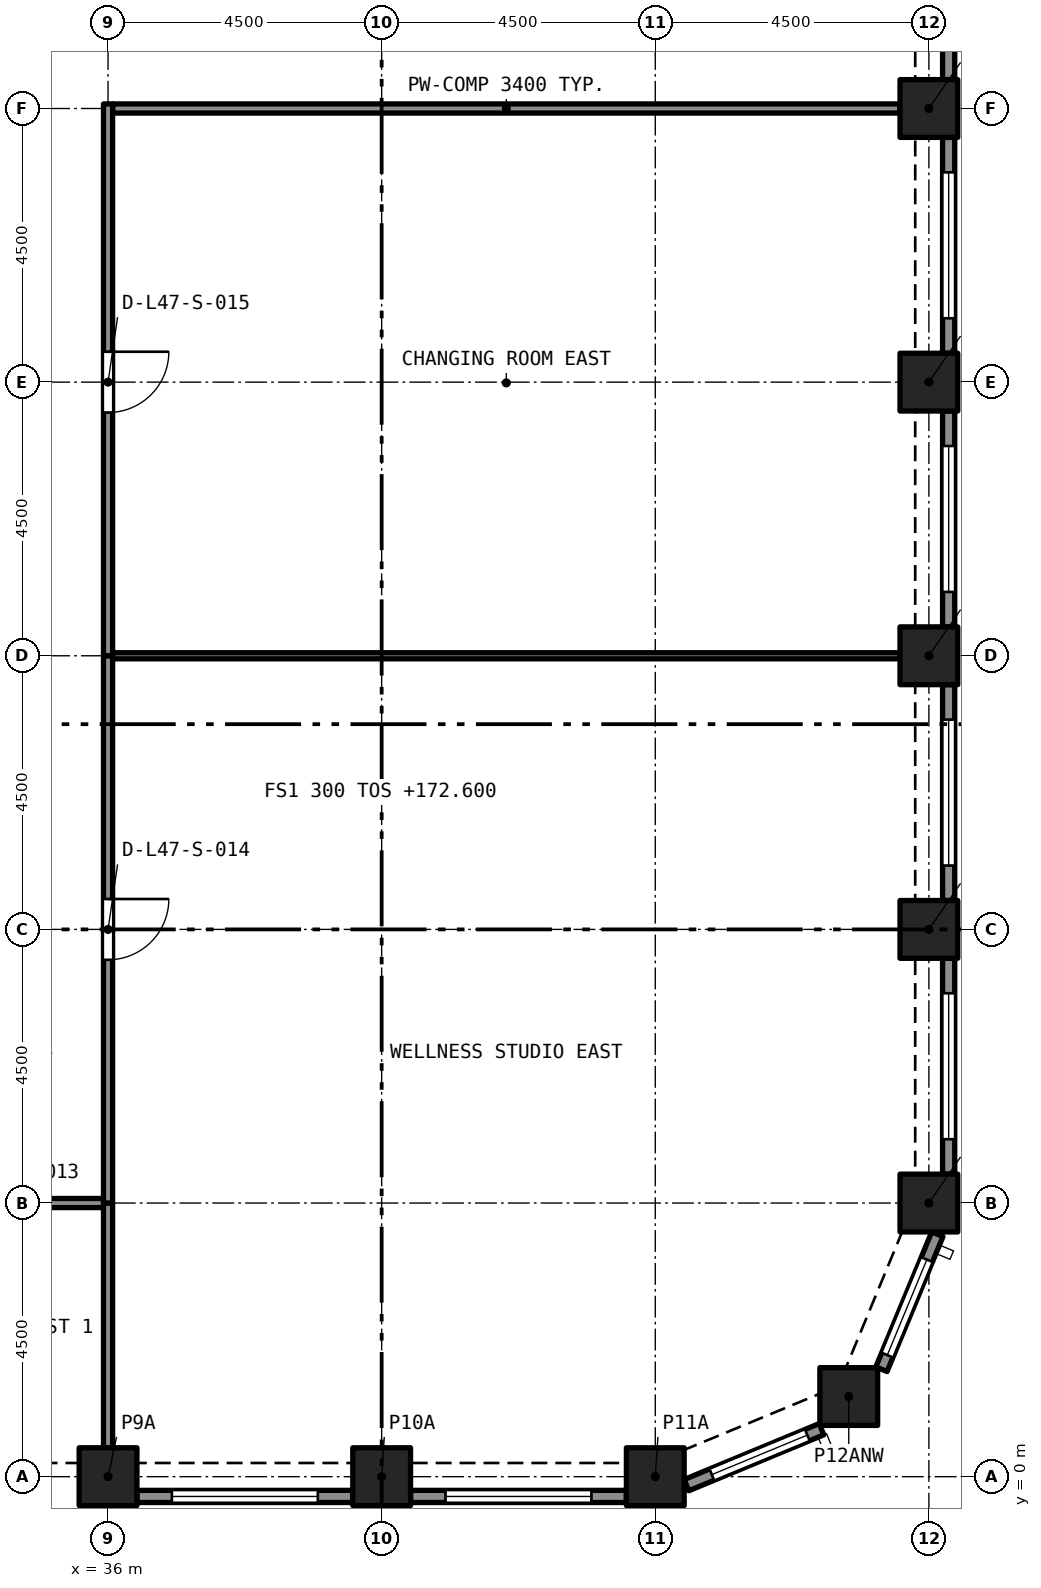
"""IFC4 building model, lengths in metres.
Left out: names, types, materials, properties, quantities, classifications, styles, units other than length and angle.
Written with IfcOpenShell. Run it as: python <this file> out.ifc"""

import sys

from ifc_helpers import new_model, si_unit, direction, frame, frame_2d, origin, origin_2d, place, context, subcontext, project, spatial, rectangle, extrude, element, fill, save


model = new_model("IFC4")
c1 = context("Model", 3, precision=1e-05, world=origin(), true_north=direction((0.0, 1.0)))
c2 = subcontext(c1, "Body", "Model", "MODEL_VIEW")
j1 = project(units=[si_unit("LENGTHUNIT", "METRE"), si_unit("PLANEANGLEUNIT", "RADIAN")], contexts=[c1])
p1 = place(None, origin())
s1 = spatial("IfcSite", under=j1, at=p1, CompositionType="ELEMENT")
p2 = place(p1, origin())
s2 = spatial("IfcBuilding", under=s1, at=p2, CompositionType="ELEMENT")
p3 = place(p2, frame((0.0, 0.0, 172.6)))
s3 = spatial("IfcBuildingStorey", under=s2, at=p3, CompositionType="ELEMENT", Elevation=172.6)
for number, where, z_axis, x_axis in (
    (1, (36.0, 0.0, 0.0), (0.0, 0.0, 1.0), (1.0, 0.0, 0.0)),
    (2, (40.5, 0.0, 0.0), (0.0, 0.0, 1.0), (1.0, 0.0, 0.0)),
    (3, (45.0, 0.0, 0.0), (0.0, 0.0, 1.0), (1.0, 0.0, 0.0)),
    (4, (48.182, 1.318, 0.0), (0.0, 0.0, 1.0), (1.0, 0.0, 0.0)),
    (5, (49.5, 4.5, 0.0), (0.0, 0.0, 1.0), (1.0, 0.0, 0.0)),
    (6, (49.5, 9.0, 0.0), (0.0, 0.0, 1.0), (1.0, 0.0, 0.0)),
    (7, (49.5, 13.5, 0.0), (0.0, 0.0, 1.0), (1.0, 0.0, 0.0)),
    (8, (49.5, 18.0, 0.0), (0.0, 0.0, 1.0), (1.0, 0.0, 0.0)),
    (9, (49.5, 22.5, 0.0), (0.0, 0.0, 1.0), (1.0, 0.0, 0.0)),
):
    element("IfcColumn", number, at=place(p3, frame(where, z_axis=z_axis, x_axis=x_axis)), inside=s3, PredefinedType="COLUMN", context=c2, shape_type="SweptSolid", body=[
        extrude(rectangle(XDim=0.95, YDim=0.95, at=origin_2d()), origin(), (0.0, 0.0, 1.0), 3.7),
    ])
p4 = place(p3, frame((40.025, -0.325, 0.0), z_axis=(0.0, 0.0, 1.0), x_axis=(-1.0, 0.0, 0.0)))
e10 = element("IfcWall", 10, at=p4, inside=s3, PredefinedType="SOLIDWALL", context=c2, shape_type="SweptSolid", body=[
    extrude(rectangle(XDim=3.55, YDim=0.2, at=frame_2d((1.775, 0.0))), origin(), (0.0, 0.0, 1.0), 3.7),
])
p5 = place(p4, frame((0.575, 0.0, 0.45)))
e11 = element("IfcOpeningElement", 11, at=p5, cuts=e10, PredefinedType="OPENING", context=c2, shape_type="SweptSolid", body=[
    extrude(rectangle(XDim=2.4, YDim=1.95, at=frame_2d((1.2, 0.975))), frame((0.0, 0.11, 0.0), z_axis=(0.0, -1.0, 0.0), x_axis=(1.0, 0.0, 0.0)), (0.0, 0.0, 1.0), 0.22),
])
p6 = place(p3, frame((44.525, -0.325, 0.0), z_axis=(0.0, 0.0, 1.0), x_axis=(-1.0, 0.0, 0.0)))
e12 = element("IfcWall", 12, at=p6, inside=s3, PredefinedType="SOLIDWALL", context=c2, shape_type="SweptSolid", body=[
    extrude(rectangle(XDim=3.55, YDim=0.2, at=frame_2d((1.775, 0.0))), origin(), (0.0, 0.0, 1.0), 3.7),
])
p7 = place(p6, frame((0.575, 0.0, 0.45)))
e13 = element("IfcOpeningElement", 13, at=p7, cuts=e12, PredefinedType="OPENING", context=c2, shape_type="SweptSolid", body=[
    extrude(rectangle(XDim=2.4, YDim=1.95, at=frame_2d((1.2, 0.975))), frame((0.0, 0.11, 0.0), z_axis=(0.0, -1.0, 0.0), x_axis=(1.0, 0.0, 0.0)), (0.0, 0.0, 1.0), 0.22),
])
p8 = place(p3, frame((47.733, 0.78, 0.0), z_axis=(0.0, 0.0, 1.0), x_axis=(-0.923880599843, -0.382680855588, 0.0)))
e14 = element("IfcWall", 14, at=p8, inside=s3, PredefinedType="SOLIDWALL", context=c2, shape_type="SweptSolid", body=[
    extrude(rectangle(XDim=2.403, YDim=0.2, at=frame_2d((1.201, 0.0))), origin(), (0.0, 0.0, 1.0), 3.7),
])
p9 = place(p8, frame((0.251, 0.0, 0.45)))
e15 = element("IfcOpeningElement", 15, at=p9, cuts=e14, PredefinedType="OPENING", context=c2, shape_type="SweptSolid", body=[
    extrude(rectangle(XDim=1.7, YDim=1.95, at=frame_2d((0.85, 0.975))), frame((0.0, 0.11, 0.0), z_axis=(0.0, -1.0, 0.0), x_axis=(1.0, 0.0, 0.0)), (0.0, 0.0, 1.0), 0.22),
])
p10 = place(p3, frame((49.639, 3.987, 0.0), z_axis=(0.0, 0.0, 1.0), x_axis=(-0.382680855588, -0.923880599843, 0.0)))
e16 = element("IfcWall", 16, at=p10, inside=s3, PredefinedType="SOLIDWALL", context=c2, shape_type="SweptSolid", body=[
    extrude(rectangle(XDim=2.403, YDim=0.2, at=frame_2d((1.201, 0.0))), origin(), (0.0, 0.0, 1.0), 3.7),
])
p11 = place(p10, frame((0.451, 0.0, 0.45)))
e17 = element("IfcOpeningElement", 17, at=p11, cuts=e16, PredefinedType="OPENING", context=c2, shape_type="SweptSolid", body=[
    extrude(rectangle(XDim=1.7, YDim=1.95, at=frame_2d((0.85, 0.975))), frame((0.0, 0.11, 0.0), z_axis=(0.0, -1.0, 0.0), x_axis=(1.0, 0.0, 0.0)), (0.0, 0.0, 1.0), 0.22),
])
p12 = place(p3, frame((49.825, 8.525, 0.0), z_axis=(0.0, 0.0, 1.0), x_axis=(0.0, -1.0, 0.0)))
e18 = element("IfcWall", 18, at=p12, inside=s3, PredefinedType="SOLIDWALL", context=c2, shape_type="SweptSolid", body=[
    extrude(rectangle(XDim=3.55, YDim=0.2, at=frame_2d((1.775, 0.0))), origin(), (0.0, 0.0, 1.0), 3.7),
])
p13 = place(p12, frame((0.575, 0.0, 0.45)))
e19 = element("IfcOpeningElement", 19, at=p13, cuts=e18, PredefinedType="OPENING", context=c2, shape_type="SweptSolid", body=[
    extrude(rectangle(XDim=2.4, YDim=1.95, at=frame_2d((1.2, 0.975))), frame((0.0, 0.11, 0.0), z_axis=(0.0, -1.0, 0.0), x_axis=(1.0, 0.0, 0.0)), (0.0, 0.0, 1.0), 0.22),
])
p14 = place(p3, frame((49.825, 13.025, 0.0), z_axis=(0.0, 0.0, 1.0), x_axis=(0.0, -1.0, 0.0)))
e20 = element("IfcWall", 20, at=p14, inside=s3, PredefinedType="SOLIDWALL", context=c2, shape_type="SweptSolid", body=[
    extrude(rectangle(XDim=3.55, YDim=0.2, at=frame_2d((1.775, 0.0))), origin(), (0.0, 0.0, 1.0), 3.7),
])
p15 = place(p14, frame((0.575, 0.0, 0.45)))
e21 = element("IfcOpeningElement", 21, at=p15, cuts=e20, PredefinedType="OPENING", context=c2, shape_type="SweptSolid", body=[
    extrude(rectangle(XDim=2.4, YDim=1.95, at=frame_2d((1.2, 0.975))), frame((0.0, 0.11, 0.0), z_axis=(0.0, -1.0, 0.0), x_axis=(1.0, 0.0, 0.0)), (0.0, 0.0, 1.0), 0.22),
])
p16 = place(p3, frame((49.825, 17.525, 0.0), z_axis=(0.0, 0.0, 1.0), x_axis=(0.0, -1.0, 0.0)))
e22 = element("IfcWall", 22, at=p16, inside=s3, PredefinedType="SOLIDWALL", context=c2, shape_type="SweptSolid", body=[
    extrude(rectangle(XDim=3.55, YDim=0.2, at=frame_2d((1.775, 0.0))), origin(), (0.0, 0.0, 1.0), 3.7),
])
p17 = place(p16, frame((0.575, 0.0, 0.45)))
e23 = element("IfcOpeningElement", 23, at=p17, cuts=e22, PredefinedType="OPENING", context=c2, shape_type="SweptSolid", body=[
    extrude(rectangle(XDim=2.4, YDim=1.95, at=frame_2d((1.2, 0.975))), frame((0.0, 0.11, 0.0), z_axis=(0.0, -1.0, 0.0), x_axis=(1.0, 0.0, 0.0)), (0.0, 0.0, 1.0), 0.22),
])
p18 = place(p3, frame((49.825, 22.025, 0.0), z_axis=(0.0, 0.0, 1.0), x_axis=(0.0, -1.0, 0.0)))
e24 = element("IfcWall", 24, at=p18, inside=s3, PredefinedType="SOLIDWALL", context=c2, shape_type="SweptSolid", body=[
    extrude(rectangle(XDim=3.55, YDim=0.2, at=frame_2d((1.775, 0.0))), origin(), (0.0, 0.0, 1.0), 3.7),
])
p19 = place(p18, frame((0.575, 0.0, 0.45)))
e25 = element("IfcOpeningElement", 25, at=p19, cuts=e24, PredefinedType="OPENING", context=c2, shape_type="SweptSolid", body=[
    extrude(rectangle(XDim=2.4, YDim=1.95, at=frame_2d((1.2, 0.975))), frame((0.0, 0.11, 0.0), z_axis=(0.0, -1.0, 0.0), x_axis=(1.0, 0.0, 0.0)), (0.0, 0.0, 1.0), 0.22),
])
p20 = place(p3, frame((49.825, 26.525, 0.0), z_axis=(0.0, 0.0, 1.0), x_axis=(0.0, -1.0, 0.0)))
e26 = element("IfcWall", 26, at=p20, inside=s3, PredefinedType="SOLIDWALL", context=c2, shape_type="SweptSolid", body=[
    extrude(rectangle(XDim=3.55, YDim=0.2, at=frame_2d((1.775, 0.0))), origin(), (0.0, 0.0, 1.0), 3.7),
])
p21 = place(p20, frame((0.575, 0.0, 0.45)))
e27 = element("IfcOpeningElement", 27, at=p21, cuts=e26, PredefinedType="OPENING", context=c2, shape_type="SweptSolid", body=[
    extrude(rectangle(XDim=2.4, YDim=1.95, at=frame_2d((1.2, 0.975))), frame((0.0, 0.11, 0.0), z_axis=(0.0, -1.0, 0.0), x_axis=(1.0, 0.0, 0.0)), (0.0, 0.0, 1.0), 0.22),
])
p22 = place(p3, frame((36.075, 22.5, 0.0), z_axis=(0.0, 0.0, 1.0), x_axis=(1.0, 0.0, 0.0)))
e28 = element("IfcWall", 28, at=p22, inside=s3, PredefinedType="PARTITIONING", context=c2, shape_type="SweptSolid", body=[
    extrude(rectangle(XDim=12.95, YDim=0.15, at=frame_2d((6.475, 0.0))), origin(), (0.0, 0.0, 1.0), 3.4),
])
p23 = place(p3, frame((36.0, 0.475, 0.0), z_axis=(0.0, 0.0, 1.0), x_axis=(0.0, 1.0, 0.0)))
e29 = element("IfcWall", 29, at=p23, inside=s3, PredefinedType="PARTITIONING", context=c2, shape_type="SweptSolid", body=[
    extrude(rectangle(XDim=4.025, YDim=0.15, at=frame_2d((2.012, 0.0))), origin(), (0.0, 0.0, 1.0), 3.4),
])
p24 = place(p3, frame((35.925, 4.5, 0.0), z_axis=(0.0, 0.0, 1.0), x_axis=(-1.0, 0.0, 0.0)))
e30 = element("IfcWall", 30, at=p24, inside=s3, PredefinedType="PARTITIONING", context=c2, shape_type="SweptSolid", body=[
    extrude(rectangle(XDim=3.95, YDim=0.15, at=frame_2d((1.975, 0.0))), origin(), (0.0, 0.0, 1.0), 3.4),
])
p25 = place(p24, frame((1.538, 0.0, 0.0)))
e31 = element("IfcOpeningElement", 31, at=p25, cuts=e30, PredefinedType="OPENING", context=c2, shape_type="SweptSolid", body=[
    extrude(rectangle(XDim=0.8, YDim=2.1, at=frame_2d((0.4, 1.05))), frame((0.0, 0.085, 0.0), z_axis=(0.0, -1.0, 0.0), x_axis=(1.0, 0.0, 0.0)), (0.0, 0.0, 1.0), 0.17),
])
p26 = place(p3, frame((36.0, 13.5, 0.0), z_axis=(0.0, 0.0, 1.0), x_axis=(0.0, -1.0, 0.0)))
e32 = element("IfcWall", 32, at=p26, inside=s3, PredefinedType="PARTITIONING", context=c2, shape_type="SweptSolid", body=[
    extrude(rectangle(XDim=9.0, YDim=0.15, at=frame_2d((4.5, 0.0))), origin(), (0.0, 0.0, 1.0), 3.4),
])
p27 = place(p26, frame((4.0, 0.0, 0.0)))
e33 = element("IfcOpeningElement", 33, at=p27, cuts=e32, PredefinedType="OPENING", context=c2, shape_type="SweptSolid", body=[
    extrude(rectangle(XDim=1.0, YDim=2.1, at=frame_2d((0.5, 1.05))), frame((0.0, 0.085, 0.0), z_axis=(0.0, -1.0, 0.0), x_axis=(1.0, 0.0, 0.0)), (0.0, 0.0, 1.0), 0.17),
])
p28 = place(p3, frame((36.0, 22.575, 0.0), z_axis=(0.0, 0.0, 1.0), x_axis=(0.0, -1.0, 0.0)))
e34 = element("IfcWall", 34, at=p28, inside=s3, PredefinedType="PARTITIONING", context=c2, shape_type="SweptSolid", body=[
    extrude(rectangle(XDim=9.075, YDim=0.15, at=frame_2d((4.538, 0.0))), origin(), (0.0, 0.0, 1.0), 3.4),
])
p29 = place(p28, frame((4.075, 0.0, 0.0)))
e35 = element("IfcOpeningElement", 35, at=p29, cuts=e34, PredefinedType="OPENING", context=c2, shape_type="SweptSolid", body=[
    extrude(rectangle(XDim=1.0, YDim=2.1, at=frame_2d((0.5, 1.05))), frame((0.0, 0.085, 0.0), z_axis=(0.0, -1.0, 0.0), x_axis=(1.0, 0.0, 0.0)), (0.0, 0.0, 1.0), 0.17),
])
p30 = place(p3, frame((36.075, 13.5, 0.0), z_axis=(0.0, 0.0, 1.0), x_axis=(1.0, 0.0, 0.0)))
e36 = element("IfcWall", 36, at=p30, inside=s3, PredefinedType="PARTITIONING", context=c2, shape_type="SweptSolid", body=[
    extrude(rectangle(XDim=12.95, YDim=0.1, at=frame_2d((6.475, 0.0))), origin(), (0.0, 0.0, 1.0), 3.4),
])
p31 = place(p5, origin())
e37 = element("IfcWindow", 37, at=p31, inside=s3, PartitioningType="SINGLE_PANEL", PredefinedType="WINDOW", context=c2, shape_type="SweptSolid", body=[
    extrude(rectangle(XDim=2.4, YDim=1.95, at=frame_2d((1.2, 0.975))), frame((0.0, 0.03, 0.0), z_axis=(0.0, -1.0, 0.0), x_axis=(1.0, 0.0, 0.0)), (0.0, 0.0, 1.0), 0.06),
])
fill(e11, e37)
p32 = place(p7, origin())
e38 = element("IfcWindow", 38, at=p32, inside=s3, PartitioningType="SINGLE_PANEL", PredefinedType="WINDOW", context=c2, shape_type="SweptSolid", body=[
    extrude(rectangle(XDim=2.4, YDim=1.95, at=frame_2d((1.2, 0.975))), frame((0.0, 0.03, 0.0), z_axis=(0.0, -1.0, 0.0), x_axis=(1.0, 0.0, 0.0)), (0.0, 0.0, 1.0), 0.06),
])
fill(e13, e38)
p33 = place(p9, origin())
e39 = element("IfcWindow", 39, at=p33, inside=s3, PartitioningType="SINGLE_PANEL", PredefinedType="WINDOW", context=c2, shape_type="SweptSolid", body=[
    extrude(rectangle(XDim=1.7, YDim=1.95, at=frame_2d((0.85, 0.975))), frame((0.0, 0.03, 0.0), z_axis=(0.0, -1.0, 0.0), x_axis=(1.0, 0.0, 0.0)), (0.0, 0.0, 1.0), 0.06),
])
fill(e15, e39)
p34 = place(p11, origin())
e40 = element("IfcWindow", 40, at=p34, inside=s3, PartitioningType="SINGLE_PANEL", PredefinedType="WINDOW", context=c2, shape_type="SweptSolid", body=[
    extrude(rectangle(XDim=1.7, YDim=1.95, at=frame_2d((0.85, 0.975))), frame((0.0, 0.03, 0.0), z_axis=(0.0, -1.0, 0.0), x_axis=(1.0, 0.0, 0.0)), (0.0, 0.0, 1.0), 0.06),
])
fill(e17, e40)
p35 = place(p13, origin())
e41 = element("IfcWindow", 41, at=p35, inside=s3, PartitioningType="SINGLE_PANEL", PredefinedType="WINDOW", context=c2, shape_type="SweptSolid", body=[
    extrude(rectangle(XDim=2.4, YDim=1.95, at=frame_2d((1.2, 0.975))), frame((0.0, 0.03, 0.0), z_axis=(0.0, -1.0, 0.0), x_axis=(1.0, 0.0, 0.0)), (0.0, 0.0, 1.0), 0.06),
])
fill(e19, e41)
p36 = place(p15, origin())
e42 = element("IfcWindow", 42, at=p36, inside=s3, PartitioningType="SINGLE_PANEL", PredefinedType="WINDOW", context=c2, shape_type="SweptSolid", body=[
    extrude(rectangle(XDim=2.4, YDim=1.95, at=frame_2d((1.2, 0.975))), frame((0.0, 0.03, 0.0), z_axis=(0.0, -1.0, 0.0), x_axis=(1.0, 0.0, 0.0)), (0.0, 0.0, 1.0), 0.06),
])
fill(e21, e42)
p37 = place(p17, origin())
e43 = element("IfcWindow", 43, at=p37, inside=s3, PartitioningType="SINGLE_PANEL", PredefinedType="WINDOW", context=c2, shape_type="SweptSolid", body=[
    extrude(rectangle(XDim=2.4, YDim=1.95, at=frame_2d((1.2, 0.975))), frame((0.0, 0.03, 0.0), z_axis=(0.0, -1.0, 0.0), x_axis=(1.0, 0.0, 0.0)), (0.0, 0.0, 1.0), 0.06),
])
fill(e23, e43)
p38 = place(p19, origin())
e44 = element("IfcWindow", 44, at=p38, inside=s3, PartitioningType="SINGLE_PANEL", PredefinedType="WINDOW", context=c2, shape_type="SweptSolid", body=[
    extrude(rectangle(XDim=2.4, YDim=1.95, at=frame_2d((1.2, 0.975))), frame((0.0, 0.03, 0.0), z_axis=(0.0, -1.0, 0.0), x_axis=(1.0, 0.0, 0.0)), (0.0, 0.0, 1.0), 0.06),
])
fill(e25, e44)
p39 = place(p27, origin())
e45 = element("IfcDoor", 45, at=p39, inside=s3, OperationType="SINGLE_SWING_RIGHT", PredefinedType="DOOR", context=c2, shape_type="SweptSolid", body=[
    extrude(rectangle(XDim=1.0, YDim=2.1, at=frame_2d((0.5, 1.05))), frame((0.0, 0.025, 0.0), z_axis=(0.0, -1.0, 0.0), x_axis=(1.0, 0.0, 0.0)), (0.0, 0.0, 1.0), 0.05),
])
fill(e33, e45)
p40 = place(p29, origin())
e46 = element("IfcDoor", 46, at=p40, inside=s3, OperationType="SINGLE_SWING_RIGHT", PredefinedType="DOOR", context=c2, shape_type="SweptSolid", body=[
    extrude(rectangle(XDim=1.0, YDim=2.1, at=frame_2d((0.5, 1.05))), frame((0.0, 0.025, 0.0), z_axis=(0.0, -1.0, 0.0), x_axis=(1.0, 0.0, 0.0)), (0.0, 0.0, 1.0), 0.05),
])
fill(e35, e46)
save(model, sys.argv[1])
